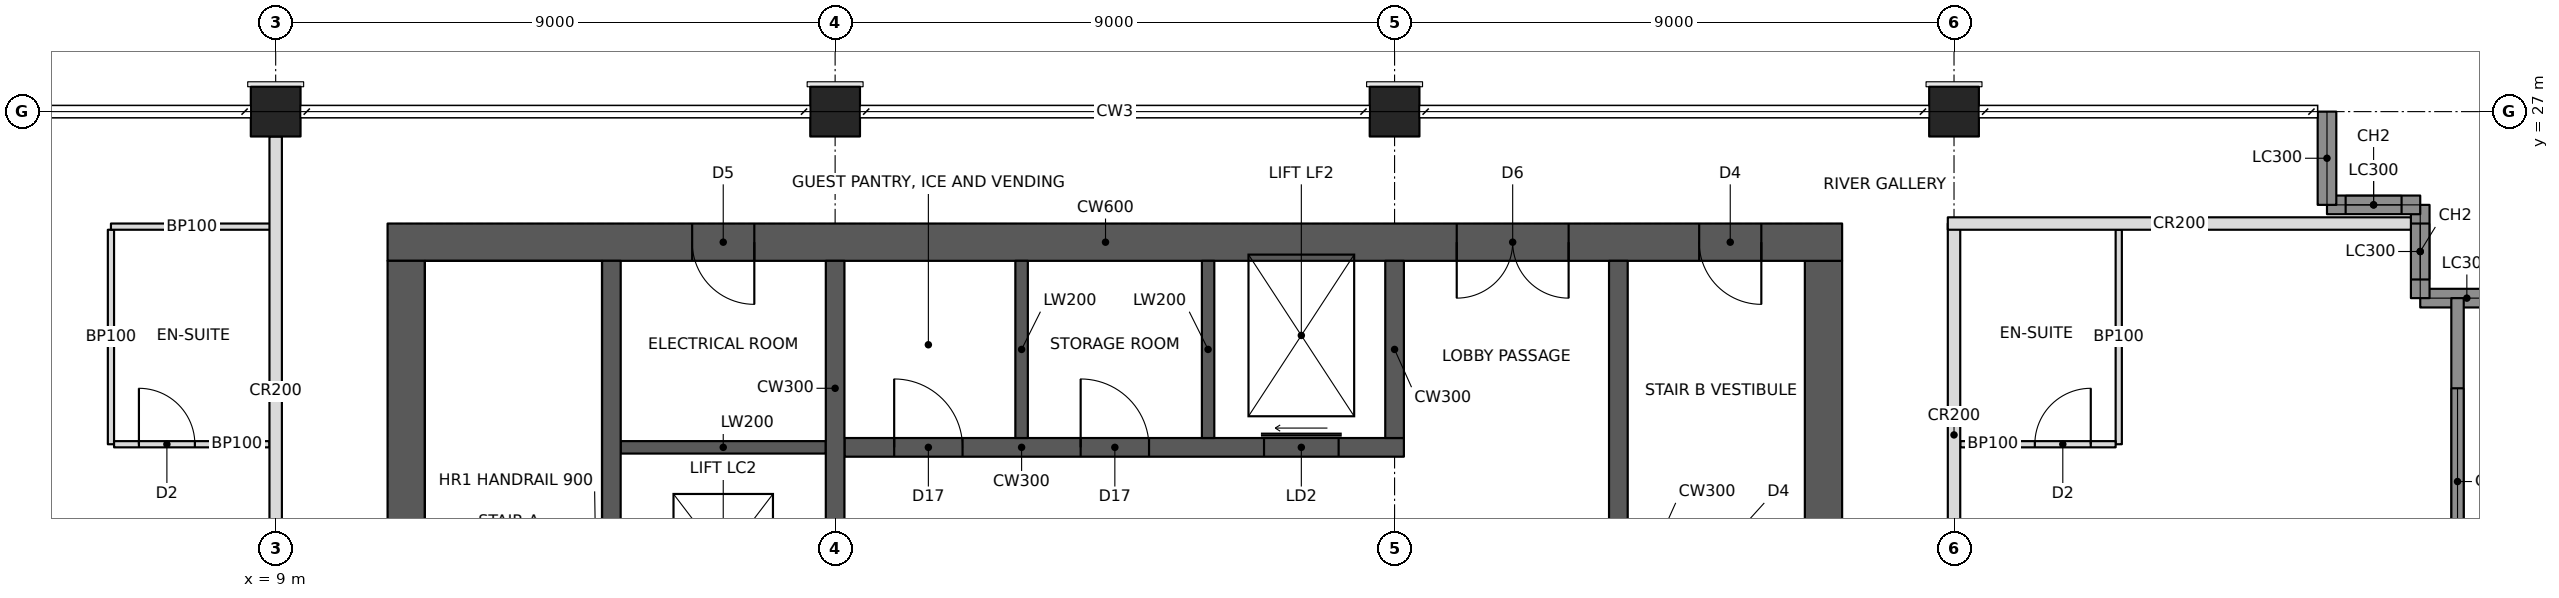
"""IFC4 building model, lengths in metres.
Left out: names, types, materials, properties, quantities, classifications, styles, units other than length and angle.
Written with IfcOpenShell. Run it as: python <this file> out.ifc"""

import sys

from ifc_helpers import new_model, si_unit, direction, frame, frame_2d, origin, origin_2d, place, context, subcontext, project, spatial, rectangle, hollow_rectangle, extrude, element, fill, save


model = new_model("IFC4")
c1 = context("Model", 3, precision=1e-05, world=origin(), true_north=direction((0.0, 1.0)))
c2 = subcontext(c1, "Body", "Model", "MODEL_VIEW")
j1 = project(units=[si_unit("LENGTHUNIT", "METRE"), si_unit("PLANEANGLEUNIT", "RADIAN")], contexts=[c1])
p1 = place(None, origin())
s1 = spatial("IfcSite", under=j1, at=p1, CompositionType="ELEMENT")
p2 = place(p1, origin())
s2 = spatial("IfcBuilding", under=s1, at=p2, CompositionType="ELEMENT")
p3 = place(p2, frame((0.0, 0.0, 204.6)))
s3 = spatial("IfcBuildingStorey", under=s2, at=p3, CompositionType="ELEMENT", Elevation=204.6)
for number, where, z_axis, x_axis in (
    (1, (9.0, 27.0, 0.0), (0.0, 0.0, 1.0), (1.0, 0.0, 0.0)),
    (2, (18.0, 27.0, 0.0), (0.0, 0.0, 1.0), (1.0, 0.0, 0.0)),
    (3, (27.0, 27.0, 0.0), (0.0, 0.0, 1.0), (1.0, 0.0, 0.0)),
    (4, (36.0, 27.0, 0.0), (0.0, 0.0, 1.0), (1.0, 0.0, 0.0)),
):
    element("IfcColumn", number, at=place(p3, frame(where, z_axis=z_axis, x_axis=x_axis)), inside=s3, PredefinedType="COLUMN", context=c2, shape_type="SweptSolid", body=[
        extrude(hollow_rectangle(XDim=0.8, YDim=0.8, WallThickness=0.06, at=origin_2d()), origin(), (0.0, 0.0, 1.0), 3.4),
    ])
p4 = place(p3, frame((10.8, 24.9, 0.0), z_axis=(0.0, 0.0, 1.0), x_axis=(1.0, 0.0, 0.0)))
e5 = element("IfcWall", 5, at=p4, inside=s3, PredefinedType="SHEAR", context=c2, shape_type="SweptSolid", body=[
    extrude(rectangle(XDim=23.4, YDim=0.6, at=frame_2d((11.7, 0.0))), origin(), (0.0, 0.0, 1.0), 3.4),
])
p5 = place(p4, frame((17.2, 0.0, 0.0)))
e6 = element("IfcOpeningElement", 6, at=p5, cuts=e5, PredefinedType="OPENING", context=c2, shape_type="SweptSolid", body=[
    extrude(rectangle(XDim=1.8, YDim=2.1, at=frame_2d((0.9, 1.05))), frame((0.0, 0.31, 0.0), z_axis=(0.0, -1.0, 0.0), x_axis=(1.0, 0.0, 0.0)), (0.0, 0.0, 1.0), 0.62),
])
p6 = place(p4, frame((21.1, 0.0, 0.0)))
e7 = element("IfcOpeningElement", 7, at=p6, cuts=e5, PredefinedType="OPENING", context=c2, shape_type="SweptSolid", body=[
    extrude(rectangle(XDim=1.0, YDim=2.1, at=frame_2d((0.5, 1.05))), frame((0.0, 0.31, 0.0), z_axis=(0.0, -1.0, 0.0), x_axis=(1.0, 0.0, 0.0)), (0.0, 0.0, 1.0), 0.62),
])
p7 = place(p4, frame((4.9, 0.0, 0.0)))
e8 = element("IfcOpeningElement", 8, at=p7, cuts=e5, PredefinedType="OPENING", context=c2, shape_type="SweptSolid", body=[
    extrude(rectangle(XDim=1.0, YDim=2.1, at=frame_2d((0.5, 1.05))), frame((0.0, 0.31, 0.0), z_axis=(0.0, -1.0, 0.0), x_axis=(1.0, 0.0, 0.0)), (0.0, 0.0, 1.0), 0.62),
])
for number, where, z_axis, x_axis in (
    (9, (11.1, 11.4, 0.0), (0.0, 0.0, 1.0), (0.0, 1.0, 0.0)),
    (10, (33.9, 11.4, 0.0), (0.0, 0.0, 1.0), (0.0, 1.0, 0.0)),
):
    element("IfcWall", number, at=place(p3, frame(where, z_axis=z_axis, x_axis=x_axis)), inside=s3, PredefinedType="SHEAR", context=c2, shape_type="SweptSolid", body=[
        extrude(rectangle(XDim=13.2, YDim=0.6, at=frame_2d((6.6, 0.0))), origin(), (0.0, 0.0, 1.0), 3.4),
    ])
p8 = place(p3, frame((14.4, 11.4, 0.0), z_axis=(0.0, 0.0, 1.0), x_axis=(0.0, 1.0, 0.0)))
e11 = element("IfcWall", 11, at=p8, inside=s3, PredefinedType="SHEAR", context=c2, shape_type="SweptSolid", body=[
    extrude(rectangle(XDim=13.2, YDim=0.3, at=frame_2d((6.6, 0.0))), origin(), (0.0, 0.0, 1.0), 3.4),
])
p9 = place(p3, frame((18.0, 11.4, 0.0), z_axis=(0.0, 0.0, 1.0), x_axis=(0.0, 1.0, 0.0)))
e12 = element("IfcWall", 12, at=p9, inside=s3, PredefinedType="SHEAR", context=c2, shape_type="SweptSolid", body=[
    extrude(rectangle(XDim=13.2, YDim=0.3, at=frame_2d((6.6, 0.0))), origin(), (0.0, 0.0, 1.0), 3.4),
])
p10 = place(p9, frame((3.6, 0.0, 0.0)))
e13 = element("IfcOpeningElement", 13, at=p10, cuts=e12, PredefinedType="OPENING", context=c2, shape_type="SweptSolid", body=[
    extrude(rectangle(XDim=1.0, YDim=2.1, at=frame_2d((0.5, 1.05))), frame((0.0, 0.16, 0.0), z_axis=(0.0, -1.0, 0.0), x_axis=(1.0, 0.0, 0.0)), (0.0, 0.0, 1.0), 0.32),
])
p11 = place(p9, frame((7.85, 0.0, 0.0)))
e14 = element("IfcOpeningElement", 14, at=p11, cuts=e12, PredefinedType="OPENING", context=c2, shape_type="SweptSolid", body=[
    extrude(rectangle(XDim=1.1, YDim=2.1, at=frame_2d((0.55, 1.05))), frame((0.0, 0.16, 0.0), z_axis=(0.0, -1.0, 0.0), x_axis=(1.0, 0.0, 0.0)), (0.0, 0.0, 1.0), 0.32),
])
p12 = place(p3, frame((18.15, 21.6, 0.0), z_axis=(0.0, 0.0, 1.0), x_axis=(1.0, 0.0, 0.0)))
e15 = element("IfcWall", 15, at=p12, inside=s3, PredefinedType="SHEAR", context=c2, shape_type="SweptSolid", body=[
    extrude(rectangle(XDim=9.0, YDim=0.3, at=frame_2d((4.5, 0.0))), origin(), (0.0, 0.0, 1.0), 3.4),
])
p13 = place(p12, frame((6.75, 0.0, 0.0)))
e16 = element("IfcOpeningElement", 16, at=p13, cuts=e15, PredefinedType="OPENING", context=c2, shape_type="SweptSolid", body=[
    extrude(rectangle(XDim=1.2, YDim=2.1, at=frame_2d((0.6, 1.05))), frame((0.0, 0.16, 0.0), z_axis=(0.0, -1.0, 0.0), x_axis=(1.0, 0.0, 0.0)), (0.0, 0.0, 1.0), 0.32),
])
p14 = place(p12, frame((0.8, 0.0, 0.0)))
e17 = element("IfcOpeningElement", 17, at=p14, cuts=e15, PredefinedType="OPENING", context=c2, shape_type="SweptSolid", body=[
    extrude(rectangle(XDim=1.1, YDim=2.1, at=frame_2d((0.55, 1.05))), frame((0.0, 0.16, 0.0), z_axis=(0.0, -1.0, 0.0), x_axis=(1.0, 0.0, 0.0)), (0.0, 0.0, 1.0), 0.32),
])
p15 = place(p12, frame((3.8, 0.0, 0.0)))
e18 = element("IfcOpeningElement", 18, at=p15, cuts=e15, PredefinedType="OPENING", context=c2, shape_type="SweptSolid", body=[
    extrude(rectangle(XDim=1.1, YDim=2.1, at=frame_2d((0.55, 1.05))), frame((0.0, 0.16, 0.0), z_axis=(0.0, -1.0, 0.0), x_axis=(1.0, 0.0, 0.0)), (0.0, 0.0, 1.0), 0.32),
])
p16 = place(p3, frame((27.0, 21.75, 0.0), z_axis=(0.0, 0.0, 1.0), x_axis=(0.0, 1.0, 0.0)))
e19 = element("IfcWall", 19, at=p16, inside=s3, PredefinedType="SHEAR", context=c2, shape_type="SweptSolid", body=[
    extrude(rectangle(XDim=2.85, YDim=0.3, at=frame_2d((1.425, 0.0))), origin(), (0.0, 0.0, 1.0), 3.4),
])
for number, where, z_axis, x_axis in (
    (20, (21.0, 21.75, 0.0), (0.0, 0.0, 1.0), (0.0, 1.0, 0.0)),
    (21, (24.0, 21.75, 0.0), (0.0, 0.0, 1.0), (0.0, 1.0, 0.0)),
):
    element("IfcWall", number, at=place(p3, frame(where, z_axis=z_axis, x_axis=x_axis)), inside=s3, PredefinedType="SHEAR", context=c2, shape_type="SweptSolid", body=[
        extrude(rectangle(XDim=2.85, YDim=0.2, at=frame_2d((1.425, 0.0))), origin(), (0.0, 0.0, 1.0), 3.4),
    ])
p17 = place(p3, frame((30.6, 11.4, 0.0), z_axis=(0.0, 0.0, 1.0), x_axis=(0.0, 1.0, 0.0)))
e22 = element("IfcWall", 22, at=p17, inside=s3, PredefinedType="SHEAR", context=c2, shape_type="SweptSolid", body=[
    extrude(rectangle(XDim=13.2, YDim=0.3, at=frame_2d((6.6, 0.0))), origin(), (0.0, 0.0, 1.0), 3.4),
])
p18 = place(p3, frame((14.55, 21.6, 0.0), z_axis=(0.0, 0.0, 1.0), x_axis=(1.0, 0.0, 0.0)))
e23 = element("IfcWall", 23, at=p18, inside=s3, PredefinedType="SHEAR", context=c2, shape_type="SweptSolid", body=[
    extrude(rectangle(XDim=3.3, YDim=0.2, at=frame_2d((1.65, 0.0))), origin(), (0.0, 0.0, 1.0), 3.4),
])
p19 = place(p3, frame((45.0, 24.0, 0.0), z_axis=(0.0, 0.0, 1.0), x_axis=(-1.0, 0.0, 0.0)))
e24 = element("IfcWall", 24, at=p19, inside=s3, PredefinedType="SOLIDWALL", context=c2, shape_type="SweptSolid", body=[
    extrude(rectangle(XDim=1.5, YDim=0.3, at=frame_2d((0.75, 0.0))), origin(), (0.0, 0.0, 1.0), 2.42),
])
p20 = place(p3, frame((43.5, 24.0, 0.0), z_axis=(0.0, 0.0, 1.0), x_axis=(0.0, 1.0, 0.0)))
e25 = element("IfcWall", 25, at=p20, inside=s3, PredefinedType="SOLIDWALL", context=c2, shape_type="SweptSolid", body=[
    extrude(rectangle(XDim=1.5, YDim=0.3, at=frame_2d((0.75, 0.0))), origin(), (0.0, 0.0, 1.0), 3.2),
])
p21 = place(p20, frame((0.3, 0.0, 0.6)))
e26 = element("IfcOpeningElement", 26, at=p21, cuts=e25, PredefinedType="OPENING", context=c2, shape_type="SweptSolid", body=[
    extrude(rectangle(XDim=0.9, YDim=2.2, at=frame_2d((0.45, 1.1))), frame((0.0, 0.16, 0.0), z_axis=(0.0, -1.0, 0.0), x_axis=(1.0, 0.0, 0.0)), (0.0, 0.0, 1.0), 0.32),
])
p22 = place(p3, frame((43.5, 25.5, 0.0), z_axis=(0.0, 0.0, 1.0), x_axis=(-1.0, 0.0, 0.0)))
e27 = element("IfcWall", 27, at=p22, inside=s3, PredefinedType="SOLIDWALL", context=c2, shape_type="SweptSolid", body=[
    extrude(rectangle(XDim=1.5, YDim=0.3, at=frame_2d((0.75, 0.0))), origin(), (0.0, 0.0, 1.0), 3.2),
])
p23 = place(p22, frame((0.3, 0.0, 0.6)))
e28 = element("IfcOpeningElement", 28, at=p23, cuts=e27, PredefinedType="OPENING", context=c2, shape_type="SweptSolid", body=[
    extrude(rectangle(XDim=0.9, YDim=2.2, at=frame_2d((0.45, 1.1))), frame((0.0, 0.16, 0.0), z_axis=(0.0, -1.0, 0.0), x_axis=(1.0, 0.0, 0.0)), (0.0, 0.0, 1.0), 0.32),
])
p24 = place(p3, frame((42.0, 25.5, 0.0), z_axis=(0.0, 0.0, 1.0), x_axis=(0.0, 1.0, 0.0)))
e29 = element("IfcWall", 29, at=p24, inside=s3, PredefinedType="SOLIDWALL", context=c2, shape_type="SweptSolid", body=[
    extrude(rectangle(XDim=1.5, YDim=0.3, at=frame_2d((0.75, 0.0))), origin(), (0.0, 0.0, 1.0), 2.42),
])
p25 = place(p3, frame((9.0, 18.4, 0.0), z_axis=(0.0, 0.0, 1.0), x_axis=(0.0, 1.0, 0.0)))
e30 = element("IfcWall", 30, at=p25, inside=s3, PredefinedType="PARTITIONING", context=c2, shape_type="SweptSolid", body=[
    extrude(rectangle(XDim=8.2, YDim=0.2, at=frame_2d((4.1, 0.0))), origin(), (0.0, 0.0, 1.0), 2.405),
])
p26 = place(p3, frame((36.0, 18.4, 0.0), z_axis=(0.0, 0.0, 1.0), x_axis=(0.0, 1.0, 0.0)))
e31 = element("IfcWall", 31, at=p26, inside=s3, PredefinedType="PARTITIONING", context=c2, shape_type="SweptSolid", body=[
    extrude(rectangle(XDim=6.8, YDim=0.2, at=frame_2d((3.4, 0.0))), origin(), (0.0, 0.0, 1.0), 2.405),
])
p27 = place(p3, frame((35.9, 25.2, 0.0), z_axis=(0.0, 0.0, 1.0), x_axis=(1.0, 0.0, 0.0)))
e32 = element("IfcWall", 32, at=p27, inside=s3, PredefinedType="PARTITIONING", context=c2, shape_type="SweptSolid", body=[
    extrude(rectangle(XDim=7.45, YDim=0.2, at=frame_2d((3.725, 0.0))), origin(), (0.0, 0.0, 1.0), 2.404),
])
p28 = place(p3, frame((6.35, 21.65, 0.0), z_axis=(0.0, 0.0, 1.0), x_axis=(0.0, 1.0, 0.0)))
e33 = element("IfcWall", 33, at=p28, inside=s3, PredefinedType="PARTITIONING", context=c2, shape_type="SweptSolid", body=[
    extrude(rectangle(XDim=3.45, YDim=0.1, at=frame_2d((1.725, 0.0))), origin(), (0.0, 0.0, 1.0), 3.2),
])
p29 = place(p3, frame((8.9, 21.65, 0.0), z_axis=(0.0, 0.0, 1.0), x_axis=(-1.0, 0.0, 0.0)))
e34 = element("IfcWall", 34, at=p29, inside=s3, PredefinedType="PARTITIONING", context=c2, shape_type="SweptSolid", body=[
    extrude(rectangle(XDim=2.5, YDim=0.1, at=frame_2d((1.25, 0.0))), origin(), (0.0, 0.0, 1.0), 2.404),
])
p30 = place(p29, frame((1.2, 0.0, 0.0)))
e35 = element("IfcOpeningElement", 35, at=p30, cuts=e34, PredefinedType="OPENING", context=c2, shape_type="SweptSolid", body=[
    extrude(rectangle(XDim=0.9, YDim=2.1, at=frame_2d((0.45, 1.05))), frame((0.0, 0.06, 0.0), z_axis=(0.0, -1.0, 0.0), x_axis=(1.0, 0.0, 0.0)), (0.0, 0.0, 1.0), 0.12),
])
p31 = place(p3, frame((38.65, 21.65, 0.0), z_axis=(0.0, 0.0, 1.0), x_axis=(0.0, 1.0, 0.0)))
e36 = element("IfcWall", 36, at=p31, inside=s3, PredefinedType="PARTITIONING", context=c2, shape_type="SweptSolid", body=[
    extrude(rectangle(XDim=3.45, YDim=0.1, at=frame_2d((1.725, 0.0))), origin(), (0.0, 0.0, 1.0), 3.2),
])
p32 = place(p3, frame((36.1, 21.65, 0.0), z_axis=(0.0, 0.0, 1.0), x_axis=(1.0, 0.0, 0.0)))
e37 = element("IfcWall", 37, at=p32, inside=s3, PredefinedType="PARTITIONING", context=c2, shape_type="SweptSolid", body=[
    extrude(rectangle(XDim=2.5, YDim=0.1, at=frame_2d((1.25, 0.0))), origin(), (0.0, 0.0, 1.0), 2.404),
])
p33 = place(p32, frame((1.2, 0.0, 0.0)))
e38 = element("IfcOpeningElement", 38, at=p33, cuts=e37, PredefinedType="OPENING", context=c2, shape_type="SweptSolid", body=[
    extrude(rectangle(XDim=0.9, YDim=2.1, at=frame_2d((0.45, 1.05))), frame((0.0, 0.06, 0.0), z_axis=(0.0, -1.0, 0.0), x_axis=(1.0, 0.0, 0.0)), (0.0, 0.0, 1.0), 0.12),
])
p34 = place(p3, frame((6.35, 25.15, 0.0), z_axis=(0.0, 0.0, 1.0), x_axis=(1.0, 0.0, 0.0)))
e39 = element("IfcWall", 39, at=p34, inside=s3, PredefinedType="PARTITIONING", context=c2, shape_type="SweptSolid", body=[
    extrude(rectangle(XDim=2.6, YDim=0.1, at=frame_2d((1.3, 0.0))), origin(), (0.0, 0.0, 1.0), 2.404),
])
p35 = place(p3, frame((44.1, 18.194, 0.0), z_axis=(0.0, 0.0, 1.0), x_axis=(0.0, 1.0, 0.0)))
e40 = element("IfcWall", 40, at=p35, inside=s3, PredefinedType="SOLIDWALL", context=c2, shape_type="SweptSolid", body=[
    extrude(rectangle(XDim=5.806, YDim=0.2, at=frame_2d((2.903, 0.0))), origin(), (0.0, 0.0, 1.0), 3.2),
])
p36 = place(p35, frame((1.356, 0.0, 0.6)))
e41 = element("IfcOpeningElement", 41, at=p36, cuts=e40, PredefinedType="OPENING", context=c2, shape_type="SweptSolid", body=[
    extrude(rectangle(XDim=3.0, YDim=2.2, at=frame_2d((1.5, 1.1))), frame((0.0, 0.11, 0.0), z_axis=(0.0, -1.0, 0.0), x_axis=(1.0, 0.0, 0.0)), (0.0, 0.0, 1.0), 0.22),
])
p37 = place(p21, origin())
e42 = element("IfcWindow", 42, at=p37, inside=s3, PartitioningType="SINGLE_PANEL", PredefinedType="WINDOW", context=c2, shape_type="SweptSolid", body=[
    extrude(rectangle(XDim=0.9, YDim=2.2, at=frame_2d((0.45, 1.1))), frame((0.0, 0.03, 0.0), z_axis=(0.0, -1.0, 0.0), x_axis=(1.0, 0.0, 0.0)), (0.0, 0.0, 1.0), 0.06),
])
fill(e26, e42)
p38 = place(p23, origin())
e43 = element("IfcWindow", 43, at=p38, inside=s3, PartitioningType="SINGLE_PANEL", PredefinedType="WINDOW", context=c2, shape_type="SweptSolid", body=[
    extrude(rectangle(XDim=0.9, YDim=2.2, at=frame_2d((0.45, 1.1))), frame((0.0, 0.03, 0.0), z_axis=(0.0, -1.0, 0.0), x_axis=(1.0, 0.0, 0.0)), (0.0, 0.0, 1.0), 0.06),
])
fill(e28, e43)
p39 = place(p36, origin())
e44 = element("IfcWindow", 44, at=p39, inside=s3, PartitioningType="TRIPLE_PANEL_VERTICAL", PredefinedType="WINDOW", context=c2, shape_type="SweptSolid", body=[
    extrude(rectangle(XDim=3.0, YDim=2.2, at=frame_2d((1.5, 1.1))), frame((0.0, 0.03, 0.0), z_axis=(0.0, -1.0, 0.0), x_axis=(1.0, 0.0, 0.0)), (0.0, 0.0, 1.0), 0.06),
])
fill(e41, e44)
p40 = place(p30, frame((0.9, 0.0, 0.0), z_axis=(0.0, 0.0, 1.0), x_axis=(-1.0, 0.0, 0.0)))
e45 = element("IfcDoor", 45, at=p40, inside=s3, OperationType="SINGLE_SWING_LEFT", PredefinedType="DOOR", context=c2, shape_type="SweptSolid", body=[
    extrude(rectangle(XDim=0.9, YDim=2.1, at=frame_2d((0.45, 1.05))), frame((0.0, 0.025, 0.0), z_axis=(0.0, -1.0, 0.0), x_axis=(1.0, 0.0, 0.0)), (0.0, 0.0, 1.0), 0.05),
])
fill(e35, e45)
p41 = place(p33, origin())
e46 = element("IfcDoor", 46, at=p41, inside=s3, OperationType="SINGLE_SWING_RIGHT", PredefinedType="DOOR", context=c2, shape_type="SweptSolid", body=[
    extrude(rectangle(XDim=0.9, YDim=2.1, at=frame_2d((0.45, 1.05))), frame((0.0, 0.025, 0.0), z_axis=(0.0, -1.0, 0.0), x_axis=(1.0, 0.0, 0.0)), (0.0, 0.0, 1.0), 0.05),
])
fill(e38, e46)
p42 = place(p5, frame((1.8, 0.0, 0.0), z_axis=(0.0, 0.0, 1.0), x_axis=(-1.0, 0.0, 0.0)))
e47 = element("IfcDoor", 47, at=p42, inside=s3, OperationType="DOUBLE_DOOR_SINGLE_SWING", PredefinedType="DOOR", context=c2, shape_type="SweptSolid", body=[
    extrude(rectangle(XDim=1.8, YDim=2.1, at=frame_2d((0.9, 1.05))), frame((0.0, 0.025, 0.0), z_axis=(0.0, -1.0, 0.0), x_axis=(1.0, 0.0, 0.0)), (0.0, 0.0, 1.0), 0.05),
])
fill(e6, e47)
p43 = place(p6, frame((1.0, 0.0, 0.0), z_axis=(0.0, 0.0, 1.0), x_axis=(-1.0, 0.0, 0.0)))
e48 = element("IfcDoor", 48, at=p43, inside=s3, OperationType="SINGLE_SWING_LEFT", PredefinedType="DOOR", context=c2, shape_type="SweptSolid", body=[
    extrude(rectangle(XDim=1.0, YDim=2.1, at=frame_2d((0.5, 1.05))), frame((0.0, 0.025, 0.0), z_axis=(0.0, -1.0, 0.0), x_axis=(1.0, 0.0, 0.0)), (0.0, 0.0, 1.0), 0.05),
])
fill(e7, e48)
p44 = place(p7, frame((1.0, 0.0, 0.0), z_axis=(0.0, 0.0, 1.0), x_axis=(-1.0, 0.0, 0.0)))
e49 = element("IfcDoor", 49, at=p44, inside=s3, OperationType="SINGLE_SWING_LEFT", PredefinedType="DOOR", context=c2, shape_type="SweptSolid", body=[
    extrude(rectangle(XDim=1.0, YDim=2.1, at=frame_2d((0.5, 1.05))), frame((0.0, 0.025, 0.0), z_axis=(0.0, -1.0, 0.0), x_axis=(1.0, 0.0, 0.0)), (0.0, 0.0, 1.0), 0.05),
])
fill(e8, e49)
p45 = place(p13, origin())
e50 = element("IfcDoor", 50, at=p45, inside=s3, OperationType="SLIDING_TO_LEFT", PredefinedType="DOOR", context=c2, shape_type="SweptSolid", body=[
    extrude(rectangle(XDim=1.2, YDim=2.1, at=frame_2d((0.6, 1.05))), frame((0.0, 0.025, 0.0), z_axis=(0.0, -1.0, 0.0), x_axis=(1.0, 0.0, 0.0)), (0.0, 0.0, 1.0), 0.05),
])
fill(e16, e50)
p46 = place(p14, origin())
e51 = element("IfcDoor", 51, at=p46, inside=s3, OperationType="SINGLE_SWING_LEFT", PredefinedType="DOOR", context=c2, shape_type="SweptSolid", body=[
    extrude(rectangle(XDim=1.1, YDim=2.1, at=frame_2d((0.55, 1.05))), frame((0.0, 0.025, 0.0), z_axis=(0.0, -1.0, 0.0), x_axis=(1.0, 0.0, 0.0)), (0.0, 0.0, 1.0), 0.05),
])
fill(e17, e51)
p47 = place(p15, origin())
e52 = element("IfcDoor", 52, at=p47, inside=s3, OperationType="SINGLE_SWING_LEFT", PredefinedType="DOOR", context=c2, shape_type="SweptSolid", body=[
    extrude(rectangle(XDim=1.1, YDim=2.1, at=frame_2d((0.55, 1.05))), frame((0.0, 0.025, 0.0), z_axis=(0.0, -1.0, 0.0), x_axis=(1.0, 0.0, 0.0)), (0.0, 0.0, 1.0), 0.05),
])
fill(e18, e52)
save(model, sys.argv[1])
